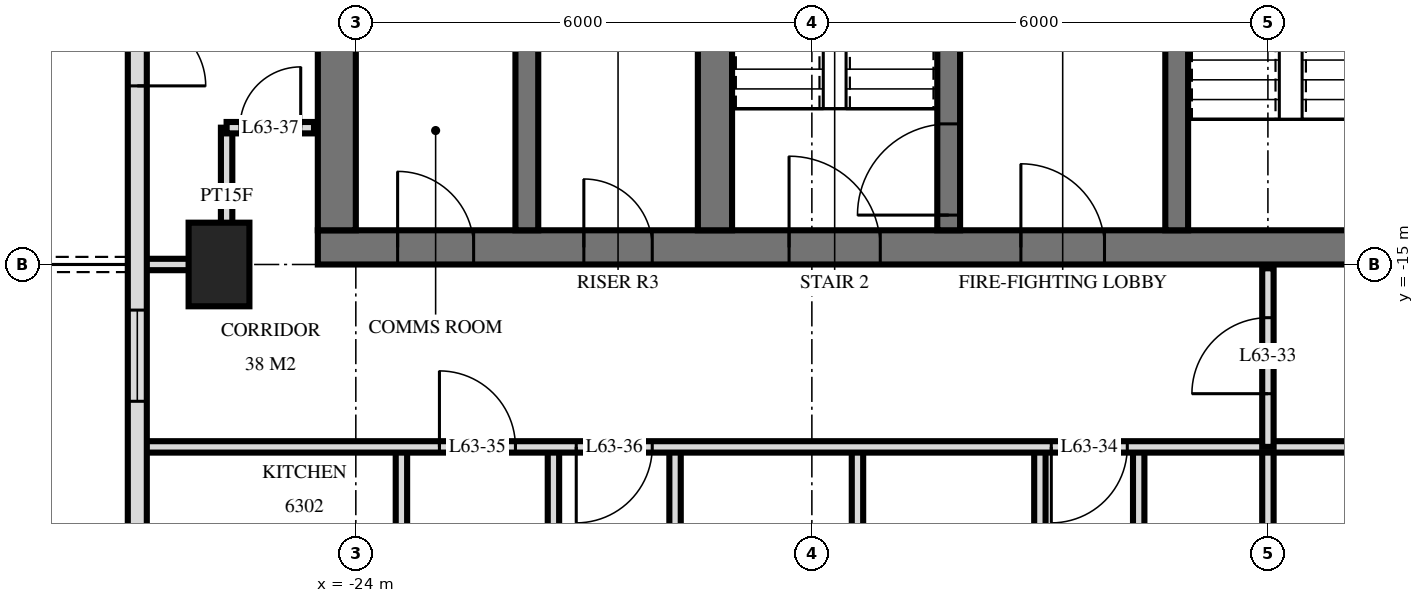
"""IFC4 building model, lengths in metres.
Left out: names, types, materials, properties, quantities, classifications, styles, units other than length and angle.
Written with IfcOpenShell. Run it as: python <this file> out.ifc"""

import sys

from ifc_helpers import new_model, si_unit, direction, frame, frame_2d, origin, origin_2d, place, context, subcontext, project, spatial, rectangle, extrude, element, fill, save


model = new_model("IFC4")
c1 = context("Model", 3, precision=1e-05, world=origin(), true_north=direction((0.0, 1.0)))
c2 = subcontext(c1, "Body", "Model", "MODEL_VIEW")
j1 = project(units=[si_unit("LENGTHUNIT", "METRE"), si_unit("PLANEANGLEUNIT", "RADIAN")], contexts=[c1])
p1 = place(None, origin())
s1 = spatial("IfcSite", under=j1, at=p1, CompositionType="ELEMENT")
p2 = place(p1, origin())
s2 = spatial("IfcBuilding", under=s1, at=p2, CompositionType="ELEMENT")
p3 = place(p2, frame((0.0, 0.0, 239.6)))
s3 = spatial("IfcBuildingStorey", under=s2, at=p3, CompositionType="ELEMENT", Elevation=239.6)
p4 = place(p3, frame((-25.8, -15.0, 0.0), z_axis=(0.0, 0.0, 1.0), x_axis=(0.0, 1.0, 0.0)))
e1 = element("IfcColumn", 1, at=p4, inside=s3, PredefinedType="COLUMN", context=c2, shape_type="SweptSolid", body=[
    extrude(rectangle(XDim=1.1, YDim=0.8, at=origin_2d()), origin(), (0.0, 0.0, 1.0), 3.5),
])
p5 = place(p3, frame((-24.5, -14.775, 0.0), z_axis=(0.0, 0.0, 1.0), x_axis=(1.0, 0.0, 0.0)))
e2 = element("IfcWall", 2, at=p5, inside=s3, PredefinedType="SHEAR", context=c2, shape_type="SweptSolid", body=[
    extrude(rectangle(XDim=14.5, YDim=0.45, at=frame_2d((7.25, 0.0))), origin(), (0.0, 0.0, 1.0), 3.5),
])
p6 = place(p5, frame((6.2, 0.0, 0.0)))
e3 = element("IfcOpeningElement", 3, at=p6, cuts=e2, PredefinedType="OPENING", context=c2, shape_type="SweptSolid", body=[
    extrude(rectangle(XDim=1.2, YDim=2.1, at=frame_2d((0.6, 1.05))), frame((0.0, 0.235, 0.0), z_axis=(0.0, -1.0, 0.0), x_axis=(1.0, 0.0, 0.0)), (0.0, 0.0, 1.0), 0.47),
])
p7 = place(p5, frame((9.25, 0.0, 0.0)))
e4 = element("IfcOpeningElement", 4, at=p7, cuts=e2, PredefinedType="OPENING", context=c2, shape_type="SweptSolid", body=[
    extrude(rectangle(XDim=1.1, YDim=2.1, at=frame_2d((0.55, 1.05))), frame((0.0, 0.235, 0.0), z_axis=(0.0, -1.0, 0.0), x_axis=(1.0, 0.0, 0.0)), (0.0, 0.0, 1.0), 0.47),
])
p8 = place(p5, frame((3.5, 0.0, 0.0)))
e5 = element("IfcOpeningElement", 5, at=p8, cuts=e2, PredefinedType="OPENING", context=c2, shape_type="SweptSolid", body=[
    extrude(rectangle(XDim=0.9, YDim=2.1, at=frame_2d((0.45, 1.05))), frame((0.0, 0.235, 0.0), z_axis=(0.0, -1.0, 0.0), x_axis=(1.0, 0.0, 0.0)), (0.0, 0.0, 1.0), 0.47),
])
p9 = place(p5, frame((1.05, 0.0, 0.0)))
e6 = element("IfcOpeningElement", 6, at=p9, cuts=e2, PredefinedType="OPENING", context=c2, shape_type="SweptSolid", body=[
    extrude(rectangle(XDim=1.0, YDim=2.1, at=frame_2d((0.5, 1.05))), frame((0.0, 0.235, 0.0), z_axis=(0.0, -1.0, 0.0), x_axis=(1.0, 0.0, 0.0)), (0.0, 0.0, 1.0), 0.47),
])
p10 = place(p3, frame((-24.25, -14.55, 0.0), z_axis=(0.0, 0.0, 1.0), x_axis=(0.0, 1.0, 0.0)))
e7 = element("IfcWall", 7, at=p10, inside=s3, PredefinedType="SHEAR", context=c2, shape_type="SweptSolid", body=[
    extrude(rectangle(XDim=14.1, YDim=0.5, at=frame_2d((7.05, 0.0))), origin(), (0.0, 0.0, 1.0), 3.5),
])
p11 = place(p3, frame((-13.2, -14.55, 0.0), z_axis=(0.0, 0.0, 1.0), x_axis=(0.0, 1.0, 0.0)))
e8 = element("IfcWall", 8, at=p11, inside=s3, PredefinedType="SHEAR", context=c2, shape_type="SweptSolid", body=[
    extrude(rectangle(XDim=5.4, YDim=0.3, at=frame_2d((2.7, 0.0))), origin(), (0.0, 0.0, 1.0), 3.5),
])
p12 = place(p11, frame((4.0, 0.0, 0.0)))
e9 = element("IfcOpeningElement", 9, at=p12, cuts=e8, PredefinedType="OPENING", context=c2, shape_type="SweptSolid", body=[
    extrude(rectangle(XDim=1.2, YDim=2.1, at=frame_2d((0.6, 1.05))), frame((0.0, 0.16, 0.0), z_axis=(0.0, -1.0, 0.0), x_axis=(1.0, 0.0, 0.0)), (0.0, 0.0, 1.0), 0.32),
])
p13 = place(p3, frame((-16.2, -14.55, 0.0), z_axis=(0.0, 0.0, 1.0), x_axis=(0.0, 1.0, 0.0)))
e10 = element("IfcWall", 10, at=p13, inside=s3, PredefinedType="SHEAR", context=c2, shape_type="SweptSolid", body=[
    extrude(rectangle(XDim=5.4, YDim=0.3, at=frame_2d((2.7, 0.0))), origin(), (0.0, 0.0, 1.0), 3.5),
])
p14 = place(p13, frame((0.2, 0.0, 0.0)))
e11 = element("IfcOpeningElement", 11, at=p14, cuts=e10, PredefinedType="OPENING", context=c2, shape_type="SweptSolid", body=[
    extrude(rectangle(XDim=1.2, YDim=2.1, at=frame_2d((0.6, 1.05))), frame((0.0, 0.16, 0.0), z_axis=(0.0, -1.0, 0.0), x_axis=(1.0, 0.0, 0.0)), (0.0, 0.0, 1.0), 0.32),
])
p15 = place(p3, frame((-19.275, -14.55, 0.0), z_axis=(0.0, 0.0, 1.0), x_axis=(0.0, 1.0, 0.0)))
e12 = element("IfcWall", 12, at=p15, inside=s3, PredefinedType="SHEAR", context=c2, shape_type="SweptSolid", body=[
    extrude(rectangle(XDim=5.4, YDim=0.45, at=frame_2d((2.7, 0.0))), origin(), (0.0, 0.0, 1.0), 3.5),
])
p16 = place(p3, frame((-21.75, -14.55, 0.0), z_axis=(0.0, 0.0, 1.0), x_axis=(0.0, 1.0, 0.0)))
e13 = element("IfcWall", 13, at=p16, inside=s3, PredefinedType="SHEAR", context=c2, shape_type="SweptSolid", body=[
    extrude(rectangle(XDim=5.4, YDim=0.3, at=frame_2d((2.7, 0.0))), origin(), (0.0, 0.0, 1.0), 3.5),
])
p17 = place(p3, frame((-26.875, -3.325, 0.0), z_axis=(0.0, 0.0, 1.0), x_axis=(0.0, -1.0, 0.0)))
e14 = element("IfcWall", 14, at=p17, inside=s3, PredefinedType="SOLIDWALL", context=c2, shape_type="SweptSolid", body=[
    extrude(rectangle(XDim=21.551, YDim=0.25, at=frame_2d((10.775, 0.0))), origin(), (0.0, 0.0, 1.0), 3.22),
])
p18 = place(p17, frame((7.525, 0.0, 0.0)))
e15 = element("IfcOpeningElement", 15, at=p18, cuts=e14, PredefinedType="OPENING", context=c2, shape_type="SweptSolid", body=[
    extrude(rectangle(XDim=1.8, YDim=2.4, at=frame_2d((0.9, 1.2))), frame((0.0, 0.135, 0.0), z_axis=(0.0, -1.0, 0.0), x_axis=(1.0, 0.0, 0.0)), (0.0, 0.0, 1.0), 0.27),
])
p19 = place(p17, frame((12.275, 0.0, 0.9)))
e16 = element("IfcOpeningElement", 16, at=p19, cuts=e14, PredefinedType="OPENING", context=c2, shape_type="SweptSolid", body=[
    extrude(rectangle(XDim=1.2, YDim=1.5, at=frame_2d((0.6, 0.75))), frame((0.0, 0.135, 0.0), z_axis=(0.0, -1.0, 0.0), x_axis=(1.0, 0.0, 0.0)), (0.0, 0.0, 1.0), 0.27),
])
p20 = place(p17, frame((15.275, 0.0, 0.0)))
e17 = element("IfcOpeningElement", 17, at=p20, cuts=e14, PredefinedType="OPENING", context=c2, shape_type="SweptSolid", body=[
    extrude(rectangle(XDim=1.8, YDim=2.4, at=frame_2d((0.9, 1.2))), frame((0.0, 0.135, 0.0), z_axis=(0.0, -1.0, 0.0), x_axis=(1.0, 0.0, 0.0)), (0.0, 0.0, 1.0), 0.27),
])
p21 = place(p17, frame((18.875, 0.0, 0.0)))
e18 = element("IfcOpeningElement", 18, at=p21, cuts=e14, PredefinedType="OPENING", context=c2, shape_type="SweptSolid", body=[
    extrude(rectangle(XDim=1.8, YDim=2.4, at=frame_2d((0.9, 1.2))), frame((0.0, 0.135, 0.0), z_axis=(0.0, -1.0, 0.0), x_axis=(1.0, 0.0, 0.0)), (0.0, 0.0, 1.0), 0.27),
])
p22 = place(p3, frame((-12.0, -17.4, 0.0), z_axis=(0.0, 0.0, 1.0), x_axis=(0.0, 1.0, 0.0)))
e19 = element("IfcWall", 19, at=p22, inside=s3, PredefinedType="PARTITIONING", context=c2, shape_type="SweptSolid", body=[
    extrude(rectangle(XDim=2.35, YDim=0.15, at=frame_2d((1.175, 0.0))), origin(), (0.0, 0.0, 1.0), 3.22),
])
p23 = place(p22, frame((0.7, 0.0, 0.0)))
e20 = element("IfcOpeningElement", 20, at=p23, cuts=e19, PredefinedType="OPENING", context=c2, shape_type="SweptSolid", body=[
    extrude(rectangle(XDim=1.0, YDim=2.1, at=frame_2d((0.5, 1.05))), frame((0.0, 0.085, 0.0), z_axis=(0.0, -1.0, 0.0), x_axis=(1.0, 0.0, 0.0)), (0.0, 0.0, 1.0), 0.17),
])
p24 = place(p3, frame((-12.0, -29.22, 0.0), z_axis=(0.0, 0.0, 1.0), x_axis=(0.0, 1.0, 0.0)))
e21 = element("IfcWall", 21, at=p24, inside=s3, PredefinedType="PARTITIONING", context=c2, shape_type="SweptSolid", body=[
    extrude(rectangle(XDim=11.82, YDim=0.15, at=frame_2d((5.91, 0.0))), origin(), (0.0, 0.0, 1.0), 3.22),
])
p25 = place(p3, frame((-13.7, -21.6, 0.0), z_axis=(0.0, 0.0, 1.0), x_axis=(0.0, 1.0, 0.0)))
e22 = element("IfcWall", 22, at=p25, inside=s3, PredefinedType="PARTITIONING", context=c2, shape_type="SweptSolid", body=[
    extrude(rectangle(XDim=4.2, YDim=0.15, at=frame_2d((2.1, 0.0))), origin(), (0.0, 0.0, 1.0), 3.22),
])
p26 = place(p25, frame((1.72, 0.0, 0.0)))
e23 = element("IfcOpeningElement", 23, at=p26, cuts=e22, PredefinedType="OPENING", context=c2, shape_type="SweptSolid", body=[
    extrude(rectangle(XDim=0.8, YDim=2.1, at=frame_2d((0.4, 1.05))), frame((0.0, 0.085, 0.0), z_axis=(0.0, -1.0, 0.0), x_axis=(1.0, 0.0, 0.0)), (0.0, 0.0, 1.0), 0.17),
])
p27 = place(p3, frame((-15.0, -29.22, 0.0), z_axis=(0.0, 0.0, 1.0), x_axis=(0.0, 1.0, 0.0)))
e24 = element("IfcWall", 24, at=p27, inside=s3, PredefinedType="PARTITIONING", context=c2, shape_type="SweptSolid", body=[
    extrude(rectangle(XDim=11.82, YDim=0.15, at=frame_2d((5.91, 0.0))), origin(), (0.0, 0.0, 1.0), 3.22),
])
for number, where, z_axis, x_axis in (
    (25, (-17.4, -21.6, 0.0), (0.0, 0.0, 1.0), (0.0, 1.0, 0.0)),
    (26, (-19.8, -21.6, 0.0), (0.0, 0.0, 1.0), (0.0, 1.0, 0.0)),
    (27, (-21.4, -21.6, 0.0), (0.0, 0.0, 1.0), (0.0, 1.0, 0.0)),
):
    element("IfcWall", number, at=place(p3, frame(where, z_axis=z_axis, x_axis=x_axis)), inside=s3, PredefinedType="PARTITIONING", context=c2, shape_type="SweptSolid", body=[
        extrude(rectangle(XDim=4.2, YDim=0.15, at=frame_2d((2.1, 0.0))), origin(), (0.0, 0.0, 1.0), 3.22),
    ])
p28 = place(p3, frame((-23.4, -21.6, 0.0), z_axis=(0.0, 0.0, 1.0), x_axis=(0.0, 1.0, 0.0)))
e28 = element("IfcWall", 28, at=p28, inside=s3, PredefinedType="PARTITIONING", context=c2, shape_type="SweptSolid", body=[
    extrude(rectangle(XDim=4.2, YDim=0.15, at=frame_2d((2.1, 0.0))), origin(), (0.0, 0.0, 1.0), 3.22),
])
p29 = place(p28, frame((1.58, 0.0, 0.0)))
e29 = element("IfcOpeningElement", 29, at=p29, cuts=e28, PredefinedType="OPENING", context=c2, shape_type="SweptSolid", body=[
    extrude(rectangle(XDim=1.0, YDim=2.1, at=frame_2d((0.5, 1.05))), frame((0.0, 0.085, 0.0), z_axis=(0.0, -1.0, 0.0), x_axis=(1.0, 0.0, 0.0)), (0.0, 0.0, 1.0), 0.17),
])
p30 = place(p3, frame((-25.7, -15.0, 0.0), z_axis=(0.0, 0.0, 1.0), x_axis=(0.0, 1.0, 0.0)))
e30 = element("IfcWall", 30, at=p30, inside=s3, PredefinedType="PARTITIONING", context=c2, shape_type="SweptSolid", body=[
    extrude(rectangle(XDim=1.8, YDim=0.15, at=frame_2d((0.9, 0.0))), origin(), (0.0, 0.0, 1.0), 3.22),
])
p31 = place(p3, frame((-26.82, -17.4, 0.0), z_axis=(0.0, 0.0, 1.0), x_axis=(1.0, 0.0, 0.0)))
e31 = element("IfcWall", 31, at=p31, inside=s3, PredefinedType="PARTITIONING", context=c2, shape_type="SweptSolid", body=[
    extrude(rectangle(XDim=53.64, YDim=0.15, at=frame_2d((26.82, 0.0))), origin(), (0.0, 0.0, 1.0), 3.22),
])
p32 = place(p31, frame((11.97, 0.0, 0.0)))
e32 = element("IfcOpeningElement", 32, at=p32, cuts=e31, PredefinedType="OPENING", context=c2, shape_type="SweptSolid", body=[
    extrude(rectangle(XDim=1.0, YDim=2.1, at=frame_2d((0.5, 1.05))), frame((0.0, 0.085, 0.0), z_axis=(0.0, -1.0, 0.0), x_axis=(1.0, 0.0, 0.0)), (0.0, 0.0, 1.0), 0.17),
])
p33 = place(p31, frame((3.92, 0.0, 0.0)))
e33 = element("IfcOpeningElement", 33, at=p33, cuts=e31, PredefinedType="OPENING", context=c2, shape_type="SweptSolid", body=[
    extrude(rectangle(XDim=1.0, YDim=2.1, at=frame_2d((0.5, 1.05))), frame((0.0, 0.085, 0.0), z_axis=(0.0, -1.0, 0.0), x_axis=(1.0, 0.0, 0.0)), (0.0, 0.0, 1.0), 0.17),
])
p34 = place(p31, frame((5.72, 0.0, 0.0)))
e34 = element("IfcOpeningElement", 34, at=p34, cuts=e31, PredefinedType="OPENING", context=c2, shape_type="SweptSolid", body=[
    extrude(rectangle(XDim=1.0, YDim=2.1, at=frame_2d((0.5, 1.05))), frame((0.0, 0.085, 0.0), z_axis=(0.0, -1.0, 0.0), x_axis=(1.0, 0.0, 0.0)), (0.0, 0.0, 1.0), 0.17),
])
p35 = place(p31, frame((47.72, 0.0, 0.0)))
e35 = element("IfcOpeningElement", 35, at=p35, cuts=e31, PredefinedType="OPENING", context=c2, shape_type="SweptSolid", body=[
    extrude(rectangle(XDim=1.0, YDim=2.1, at=frame_2d((0.5, 1.05))), frame((0.0, 0.085, 0.0), z_axis=(0.0, -1.0, 0.0), x_axis=(1.0, 0.0, 0.0)), (0.0, 0.0, 1.0), 0.17),
])
p36 = place(p31, frame((51.02, 0.0, 0.0)))
e36 = element("IfcOpeningElement", 36, at=p36, cuts=e31, PredefinedType="OPENING", context=c2, shape_type="SweptSolid", body=[
    extrude(rectangle(XDim=1.0, YDim=2.1, at=frame_2d((0.5, 1.05))), frame((0.0, 0.085, 0.0), z_axis=(0.0, -1.0, 0.0), x_axis=(1.0, 0.0, 0.0)), (0.0, 0.0, 1.0), 0.17),
])
p37 = place(p31, frame((17.32, 0.0, 0.0)))
e37 = element("IfcOpeningElement", 37, at=p37, cuts=e31, PredefinedType="OPENING", context=c2, shape_type="SweptSolid", body=[
    extrude(rectangle(XDim=1.0, YDim=2.1, at=frame_2d((0.5, 1.05))), frame((0.0, 0.085, 0.0), z_axis=(0.0, -1.0, 0.0), x_axis=(1.0, 0.0, 0.0)), (0.0, 0.0, 1.0), 0.17),
])
p38 = place(p31, frame((23.32, 0.0, 0.0)))
e38 = element("IfcOpeningElement", 38, at=p38, cuts=e31, PredefinedType="OPENING", context=c2, shape_type="SweptSolid", body=[
    extrude(rectangle(XDim=1.0, YDim=2.1, at=frame_2d((0.5, 1.05))), frame((0.0, 0.085, 0.0), z_axis=(0.0, -1.0, 0.0), x_axis=(1.0, 0.0, 0.0)), (0.0, 0.0, 1.0), 0.17),
])
p39 = place(p31, frame((29.32, 0.0, 0.0)))
e39 = element("IfcOpeningElement", 39, at=p39, cuts=e31, PredefinedType="OPENING", context=c2, shape_type="SweptSolid", body=[
    extrude(rectangle(XDim=1.0, YDim=2.1, at=frame_2d((0.5, 1.05))), frame((0.0, 0.085, 0.0), z_axis=(0.0, -1.0, 0.0), x_axis=(1.0, 0.0, 0.0)), (0.0, 0.0, 1.0), 0.17),
])
p40 = place(p31, frame((35.32, 0.0, 0.0)))
e40 = element("IfcOpeningElement", 40, at=p40, cuts=e31, PredefinedType="OPENING", context=c2, shape_type="SweptSolid", body=[
    extrude(rectangle(XDim=1.0, YDim=2.1, at=frame_2d((0.5, 1.05))), frame((0.0, 0.085, 0.0), z_axis=(0.0, -1.0, 0.0), x_axis=(1.0, 0.0, 0.0)), (0.0, 0.0, 1.0), 0.17),
])
p41 = place(p3, frame((-26.82, -15.0, 0.0), z_axis=(0.0, 0.0, 1.0), x_axis=(1.0, 0.0, 0.0)))
e41 = element("IfcWall", 41, at=p41, inside=s3, PredefinedType="PARTITIONING", context=c2, shape_type="SweptSolid", body=[
    extrude(rectangle(XDim=1.12, YDim=0.15, at=frame_2d((0.56, 0.0))), origin(), (0.0, 0.0, 1.0), 3.22),
])
p42 = place(p3, frame((-25.7, -13.2, 0.0), z_axis=(0.0, 0.0, 1.0), x_axis=(1.0, 0.0, 0.0)))
e42 = element("IfcWall", 42, at=p42, inside=s3, PredefinedType="PARTITIONING", context=c2, shape_type="SweptSolid", body=[
    extrude(rectangle(XDim=1.15, YDim=0.15, at=frame_2d((0.575, 0.0))), origin(), (0.0, 0.0, 1.0), 3.22),
])
p43 = place(p42, frame((0.175, 0.0, 0.0)))
e43 = element("IfcOpeningElement", 43, at=p43, cuts=e42, PredefinedType="OPENING", context=c2, shape_type="SweptSolid", body=[
    extrude(rectangle(XDim=0.8, YDim=2.1, at=frame_2d((0.4, 1.05))), frame((0.0, 0.085, 0.0), z_axis=(0.0, -1.0, 0.0), x_axis=(1.0, 0.0, 0.0)), (0.0, 0.0, 1.0), 0.17),
])
p44 = place(p18, origin())
e44 = element("IfcDoor", 44, at=p44, inside=s3, OperationType="DOUBLE_DOOR_SINGLE_SWING", PredefinedType="DOOR", context=c2, shape_type="SweptSolid", body=[
    extrude(rectangle(XDim=1.8, YDim=2.4, at=frame_2d((0.9, 1.2))), frame((0.0, 0.025, 0.0), z_axis=(0.0, -1.0, 0.0), x_axis=(1.0, 0.0, 0.0)), (0.0, 0.0, 1.0), 0.05),
])
fill(e15, e44)
p45 = place(p19, origin())
e45 = element("IfcWindow", 45, at=p45, inside=s3, PartitioningType="SINGLE_PANEL", PredefinedType="WINDOW", context=c2, shape_type="SweptSolid", body=[
    extrude(rectangle(XDim=1.2, YDim=1.5, at=frame_2d((0.6, 0.75))), frame((0.0, 0.03, 0.0), z_axis=(0.0, -1.0, 0.0), x_axis=(1.0, 0.0, 0.0)), (0.0, 0.0, 1.0), 0.06),
])
fill(e16, e45)
p46 = place(p6, origin())
e46 = element("IfcDoor", 46, at=p46, inside=s3, OperationType="SINGLE_SWING_RIGHT", PredefinedType="DOOR", context=c2, shape_type="SweptSolid", body=[
    extrude(rectangle(XDim=1.2, YDim=2.1, at=frame_2d((0.6, 1.05))), frame((0.0, 0.025, 0.0), z_axis=(0.0, -1.0, 0.0), x_axis=(1.0, 0.0, 0.0)), (0.0, 0.0, 1.0), 0.05),
])
fill(e3, e46)
p47 = place(p7, origin())
e47 = element("IfcDoor", 47, at=p47, inside=s3, OperationType="SINGLE_SWING_RIGHT", PredefinedType="DOOR", context=c2, shape_type="SweptSolid", body=[
    extrude(rectangle(XDim=1.1, YDim=2.1, at=frame_2d((0.55, 1.05))), frame((0.0, 0.025, 0.0), z_axis=(0.0, -1.0, 0.0), x_axis=(1.0, 0.0, 0.0)), (0.0, 0.0, 1.0), 0.05),
])
fill(e4, e47)
p48 = place(p8, origin())
e48 = element("IfcDoor", 48, at=p48, inside=s3, OperationType="SINGLE_SWING_RIGHT", PredefinedType="DOOR", context=c2, shape_type="SweptSolid", body=[
    extrude(rectangle(XDim=0.9, YDim=2.1, at=frame_2d((0.45, 1.05))), frame((0.0, 0.025, 0.0), z_axis=(0.0, -1.0, 0.0), x_axis=(1.0, 0.0, 0.0)), (0.0, 0.0, 1.0), 0.05),
])
fill(e5, e48)
p49 = place(p9, origin())
e49 = element("IfcDoor", 49, at=p49, inside=s3, OperationType="SINGLE_SWING_RIGHT", PredefinedType="DOOR", context=c2, shape_type="SweptSolid", body=[
    extrude(rectangle(XDim=1.0, YDim=2.1, at=frame_2d((0.5, 1.05))), frame((0.0, 0.025, 0.0), z_axis=(0.0, -1.0, 0.0), x_axis=(1.0, 0.0, 0.0)), (0.0, 0.0, 1.0), 0.05),
])
fill(e6, e49)
p50 = place(p14, origin())
e50 = element("IfcDoor", 50, at=p50, inside=s3, OperationType="SINGLE_SWING_RIGHT", PredefinedType="DOOR", context=c2, shape_type="SweptSolid", body=[
    extrude(rectangle(XDim=1.2, YDim=2.1, at=frame_2d((0.6, 1.05))), frame((0.0, 0.025, 0.0), z_axis=(0.0, -1.0, 0.0), x_axis=(1.0, 0.0, 0.0)), (0.0, 0.0, 1.0), 0.05),
])
fill(e11, e50)
p51 = place(p23, origin())
e51 = element("IfcDoor", 51, at=p51, inside=s3, OperationType="SINGLE_SWING_RIGHT", PredefinedType="DOOR", context=c2, shape_type="SweptSolid", body=[
    extrude(rectangle(XDim=1.0, YDim=2.1, at=frame_2d((0.5, 1.05))), frame((0.0, 0.025, 0.0), z_axis=(0.0, -1.0, 0.0), x_axis=(1.0, 0.0, 0.0)), (0.0, 0.0, 1.0), 0.05),
])
fill(e20, e51)
p52 = place(p32, frame((0.5, 0.0, 0.0), z_axis=(0.0, 0.0, 1.0), x_axis=(-1.0, 0.0, 0.0)))
e52 = element("IfcDoor", 52, at=p52, inside=s3, OperationType="SINGLE_SWING_LEFT", PredefinedType="DOOR", context=c2, shape_type="SweptSolid", body=[
    extrude(rectangle(XDim=1.0, YDim=2.1, at=frame_2d((0.0, 1.05))), frame((0.0, -0.025, 0.0), z_axis=(0.0, 1.0, 0.0), x_axis=(-1.0, 0.0, 0.0)), (0.0, 0.0, 1.0), 0.05),
])
fill(e32, e52)
p53 = place(p33, origin())
e53 = element("IfcDoor", 53, at=p53, inside=s3, OperationType="SINGLE_SWING_RIGHT", PredefinedType="DOOR", context=c2, shape_type="SweptSolid", body=[
    extrude(rectangle(XDim=1.0, YDim=2.1, at=frame_2d((0.5, 1.05))), frame((0.0, 0.025, 0.0), z_axis=(0.0, -1.0, 0.0), x_axis=(1.0, 0.0, 0.0)), (0.0, 0.0, 1.0), 0.05),
])
fill(e33, e53)
p54 = place(p34, frame((0.5, 0.0, 0.0), z_axis=(0.0, 0.0, 1.0), x_axis=(-1.0, 0.0, 0.0)))
e54 = element("IfcDoor", 54, at=p54, inside=s3, OperationType="SINGLE_SWING_LEFT", PredefinedType="DOOR", context=c2, shape_type="SweptSolid", body=[
    extrude(rectangle(XDim=1.0, YDim=2.1, at=frame_2d((0.0, 1.05))), frame((0.0, -0.025, 0.0), z_axis=(0.0, 1.0, 0.0), x_axis=(-1.0, 0.0, 0.0)), (0.0, 0.0, 1.0), 0.05),
])
fill(e34, e54)
p55 = place(p43, origin())
e55 = element("IfcDoor", 55, at=p55, inside=s3, OperationType="SINGLE_SWING_LEFT", PredefinedType="DOOR", context=c2, shape_type="SweptSolid", body=[
    extrude(rectangle(XDim=0.8, YDim=2.1, at=frame_2d((0.4, 1.05))), frame((0.0, 0.025, 0.0), z_axis=(0.0, -1.0, 0.0), x_axis=(1.0, 0.0, 0.0)), (0.0, 0.0, 1.0), 0.05),
])
fill(e43, e55)
save(model, sys.argv[1])
